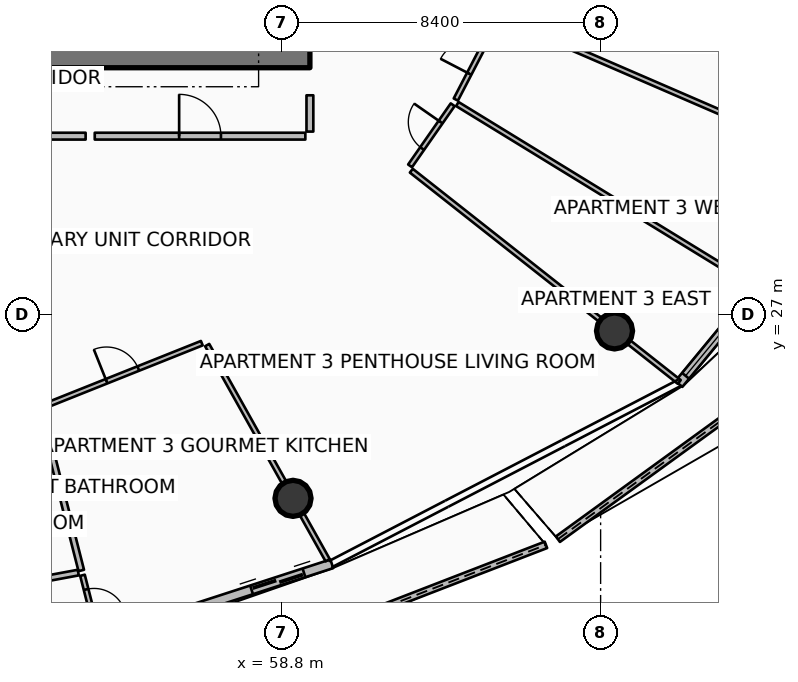
"""IFC4 building model, lengths in metres.
Left out: names, types, materials, properties, quantities, classifications, styles, units other than length and angle.
Written with IfcOpenShell. Run it as: python <this file> out.ifc"""

import sys

from ifc_helpers import new_model, si_unit, direction, frame, frame_2d, origin, origin_2d, place, context, subcontext, project, spatial, polyline, rectangle, circle, outline, extrude, element, fill, save


model = new_model("IFC4")
c1 = context("Model", 3, precision=1e-05, world=origin(), true_north=direction((0.0, 1.0)))
c2 = subcontext(c1, "Body", "Model", "MODEL_VIEW")
j1 = project(units=[si_unit("LENGTHUNIT", "METRE"), si_unit("PLANEANGLEUNIT", "RADIAN")], contexts=[c1])
p1 = place(None, origin())
s1 = spatial("IfcSite", under=j1, at=p1, CompositionType="ELEMENT")
p2 = place(p1, origin())
s2 = spatial("IfcBuilding", under=s1, at=p2, CompositionType="ELEMENT")
p3 = place(p2, frame((0.0, 0.0, 275.2)))
s3 = spatial("IfcBuildingStorey", under=s2, at=p3, CompositionType="ELEMENT", Elevation=275.2)
p4 = place(p3, frame((49.95, 33.75, 0.0), z_axis=(0.0, 0.0, 1.0), x_axis=(1.0, 0.0, 0.0)))
e1 = element("IfcWall", 1, at=p4, inside=s3, PredefinedType="SHEAR", context=c2, shape_type="SweptSolid", body=[
    extrude(rectangle(XDim=9.6, YDim=0.5, at=frame_2d((4.8, 0.0))), origin(), (0.0, 0.0, 1.0), 3.85),
])
for number, where, z_axis, x_axis in (
    (2, (59.105, 22.17, 0.0), (0.0, 0.0, 1.0), (1.0, 0.0, 0.0)),
    (3, (67.566, 26.575, 0.0), (0.0, 0.0, 1.0), (1.0, 0.0, 0.0)),
):
    element("IfcColumn", number, at=place(p3, frame(where, z_axis=z_axis, x_axis=x_axis)), inside=s3, PredefinedType="COLUMN", context=c2, shape_type="SweptSolid", body=[
        extrude(circle(Radius=0.475, at=origin_2d()), origin(), (0.0, 0.0, 1.0), 3.59),
    ])
p5 = place(p3, frame((56.172, 17.238, 0.0), z_axis=(0.0, 0.0, 1.0), x_axis=(0.9326848715, 0.36069229334, 0.0)))
e4 = element("IfcWall", 4, at=p5, inside=s3, PredefinedType="PARAPET", context=c2, shape_type="SweptSolid", body=[
    extrude(outline(polyline([(0.0, 0.0), (10.281, 0.0), (10.281, 1.224), (5.14, 1.127), (0.0, 1.148), (0.0, 0.0)])), frame((0.0, 0.09, 0.0), z_axis=(0.0, -1.0, 0.0), x_axis=(1.0, 0.0, 0.0)), (0.0, 0.0, 1.0), 0.18),
])
p6 = place(p3, frame((66.076, 21.095, 0.0), z_axis=(0.0, 0.0, 1.0), x_axis=(0.809261043527, 0.587449200722, 0.0)))
e5 = element("IfcWall", 5, at=p6, inside=s3, PredefinedType="PARAPET", context=c2, shape_type="SweptSolid", body=[
    extrude(outline(polyline([(0.0, 0.0), (11.577, 0.0), (11.577, 1.632), (5.788, 1.418), (0.0, 1.233), (0.0, 0.0)])), frame((0.0, 0.09, 0.0), z_axis=(0.0, -1.0, 0.0), x_axis=(1.0, 0.0, 0.0)), (0.0, 0.0, 1.0), 0.18),
])
p7 = place(p3, frame((50.858, 17.436, 0.0), z_axis=(0.0, 0.0, 1.0), x_axis=(0.951055974609, 0.309018661507, 0.0)))
e6 = element("IfcWall", 6, at=p7, inside=s3, PredefinedType="SOLIDWALL", context=c2, shape_type="SweptSolid", body=[
    extrude(rectangle(XDim=9.745, YDim=0.24, at=frame_2d((4.873, 0.0))), origin(), (0.0, 0.0, 1.0), 2.54),
])
p8 = place(p7, frame((7.525, 0.0, 0.0)))
e7 = element("IfcOpeningElement", 7, at=p8, cuts=e6, PredefinedType="OPENING", context=c2, shape_type="SweptSolid", body=[
    extrude(rectangle(XDim=1.45, YDim=2.15, at=frame_2d((0.725, 1.075))), frame((0.0, 0.13, 0.0), z_axis=(0.0, -1.0, 0.0), x_axis=(1.0, 0.0, 0.0)), (0.0, 0.0, 1.0), 0.26),
])
p9 = place(p7, frame((0.28, 0.0, 0.65)))
e8 = element("IfcOpeningElement", 8, at=p9, cuts=e6, PredefinedType="OPENING", context=c2, shape_type="SweptSolid", body=[
    extrude(rectangle(XDim=1.6, YDim=1.5, at=frame_2d((0.8, 0.75))), frame((0.0, 0.13, 0.0), z_axis=(0.0, -1.0, 0.0), x_axis=(1.0, 0.0, 0.0)), (0.0, 0.0, 1.0), 0.26),
])
p10 = place(p3, frame((69.258, 25.178, 0.0), z_axis=(0.0, 0.0, 1.0), x_axis=(0.636680093065, 0.771128043255, 0.0)))
e9 = element("IfcWall", 9, at=p10, inside=s3, PredefinedType="SOLIDWALL", context=c2, shape_type="SweptSolid", body=[
    extrude(rectangle(XDim=11.438, YDim=0.24, at=frame_2d((5.719, 0.0))), origin(), (0.0, 0.0, 1.0), 2.54),
])
p11 = place(p10, frame((9.218, 0.0, 0.0)))
e10 = element("IfcOpeningElement", 10, at=p11, cuts=e9, PredefinedType="OPENING", context=c2, shape_type="SweptSolid", body=[
    extrude(rectangle(XDim=1.45, YDim=2.15, at=frame_2d((0.725, 1.075))), frame((0.0, 0.13, 0.0), z_axis=(0.0, -1.0, 0.0), x_axis=(1.0, 0.0, 0.0)), (0.0, 0.0, 1.0), 0.26),
])
p12 = place(p10, frame((0.28, 0.0, 0.65)))
e11 = element("IfcOpeningElement", 11, at=p12, cuts=e9, PredefinedType="OPENING", context=c2, shape_type="SweptSolid", body=[
    extrude(rectangle(XDim=1.6, YDim=1.5, at=frame_2d((0.8, 0.75))), frame((0.0, 0.13, 0.0), z_axis=(0.0, -1.0, 0.0), x_axis=(1.0, 0.0, 0.0)), (0.0, 0.0, 1.0), 0.26),
])
p13 = place(p3, frame((53.888, 31.7, 0.0), z_axis=(0.0, 0.0, 1.0), x_axis=(1.0, 0.0, 0.0)))
e12 = element("IfcWall", 12, at=p13, inside=s3, PredefinedType="PARTITIONING", context=c2, shape_type="SweptSolid", body=[
    extrude(rectangle(XDim=5.542, YDim=0.18, at=frame_2d((2.771, 0.0))), origin(), (0.0, 0.0, 1.0), 2.957),
])
p14 = place(p13, frame((2.221, 0.0, 0.0)))
e13 = element("IfcOpeningElement", 13, at=p14, cuts=e12, PredefinedType="OPENING", context=c2, shape_type="SweptSolid", body=[
    extrude(rectangle(XDim=1.1, YDim=2.1, at=frame_2d((0.55, 1.05))), frame((0.0, 0.1, 0.0), z_axis=(0.0, -1.0, 0.0), x_axis=(1.0, 0.0, 0.0)), (0.0, 0.0, 1.0), 0.2),
])
p15 = place(p3, frame((59.55, 31.82, 0.0), z_axis=(0.0, 0.0, 1.0), x_axis=(0.0, 1.0, 0.0)))
e14 = element("IfcWall", 14, at=p15, inside=s3, PredefinedType="PARTITIONING", context=c2, shape_type="SweptSolid", body=[
    extrude(rectangle(XDim=0.955, YDim=0.18, at=frame_2d((0.477, 0.0))), origin(), (0.0, 0.0, 1.0), 2.957),
])
p16 = place(p3, frame((49.339, 31.7, 0.0), z_axis=(0.0, 0.0, 1.0), x_axis=(1.0, 0.0, 0.0)))
e15 = element("IfcWall", 15, at=p16, inside=s3, PredefinedType="PARTITIONING", context=c2, shape_type="SweptSolid", body=[
    extrude(rectangle(XDim=4.309, YDim=0.18, at=frame_2d((2.155, 0.0))), origin(), (0.0, 0.0, 1.0), 2.957),
])
p17 = place(p3, frame((56.847, 26.203, 0.0), z_axis=(0.0, 0.0, 1.0), x_axis=(0.488636594114, -0.872487409017, 0.0)))
e16 = element("IfcWall", 16, at=p17, inside=s3, PredefinedType="PARTITIONING", context=c2, shape_type="SweptSolid", body=[
    extrude(rectangle(XDim=6.489, YDim=0.125, at=frame_2d((3.244, 0.0))), origin(), (0.0, 0.0, 1.0), 2.957),
])
p18 = place(p3, frame((50.738, 19.712, 0.0), z_axis=(0.0, 0.0, 1.0), x_axis=(0.983195760322, 0.18255436693, 0.0)))
e17 = element("IfcWall", 17, at=p18, inside=s3, PredefinedType="PARTITIONING", context=c2, shape_type="SweptSolid", body=[
    extrude(rectangle(XDim=2.763, YDim=0.15, at=frame_2d((1.381, 0.0))), origin(), (0.0, 0.0, 1.0), 2.957),
])
p19 = place(p3, frame((52.466, 24.464, 0.0), z_axis=(0.0, 0.0, 1.0), x_axis=(0.246795883472, -0.969067485731, 0.0)))
e18 = element("IfcWall", 18, at=p19, inside=s3, PredefinedType="PARTITIONING", context=c2, shape_type="SweptSolid", body=[
    extrude(rectangle(XDim=4.326, YDim=0.15, at=frame_2d((2.163, 0.0))), origin(), (0.0, 0.0, 1.0), 3.03),
])
p20 = place(p3, frame((53.565, 20.146, 0.0), z_axis=(0.0, 0.0, 1.0), x_axis=(0.24689818157, -0.969041427359, 0.0)))
e19 = element("IfcWall", 19, at=p20, inside=s3, PredefinedType="PARTITIONING", context=c2, shape_type="SweptSolid", body=[
    extrude(rectangle(XDim=1.619, YDim=0.125, at=frame_2d((0.809, 0.0))), origin(), (0.0, 0.0, 1.0), 3.03),
])
p21 = place(p20, frame((0.385, 0.0, 0.0)))
e20 = element("IfcOpeningElement", 20, at=p21, cuts=e19, PredefinedType="OPENING", context=c2, shape_type="SweptSolid", body=[
    extrude(rectangle(XDim=0.85, YDim=2.06, at=frame_2d((0.425, 1.03))), frame((0.0, 0.073, 0.0), z_axis=(0.0, -1.0, 0.0), x_axis=(1.0, 0.0, 0.0)), (0.0, 0.0, 1.0), 0.145),
])
p22 = place(p3, frame((52.527, 24.584, 0.0), z_axis=(0.0, 0.0, 1.0), x_axis=(0.928678664633, 0.370885343274, 0.0)))
e21 = element("IfcWall", 21, at=p22, inside=s3, PredefinedType="PARTITIONING", context=c2, shape_type="SweptSolid", body=[
    extrude(rectangle(XDim=4.499, YDim=0.125, at=frame_2d((2.249, 0.0))), origin(), (0.0, 0.0, 1.0), 2.957),
])
p23 = place(p22, frame((1.799, 0.0, 0.0)))
e22 = element("IfcOpeningElement", 22, at=p23, cuts=e21, PredefinedType="OPENING", context=c2, shape_type="SweptSolid", body=[
    extrude(rectangle(XDim=0.9, YDim=2.08, at=frame_2d((0.45, 1.04))), frame((0.0, 0.073, 0.0), z_axis=(0.0, -1.0, 0.0), x_axis=(1.0, 0.0, 0.0)), (0.0, 0.0, 1.0), 0.145),
])
p24 = place(p3, frame((62.219, 30.791, 0.0), z_axis=(0.0, 0.0, 1.0), x_axis=(0.785316198055, -0.619094878893, 0.0)))
e23 = element("IfcWall", 23, at=p24, inside=s3, PredefinedType="PARTITIONING", context=c2, shape_type="SweptSolid", body=[
    extrude(rectangle(XDim=8.979, YDim=0.125, at=frame_2d((4.489, 0.0))), origin(), (0.0, 0.0, 1.0), 2.957),
])
p25 = place(p3, frame((63.429, 32.545, 0.0), z_axis=(0.0, 0.0, 1.0), x_axis=(0.852634226121, -0.522508254907, 0.0)))
e24 = element("IfcWall", 24, at=p25, inside=s3, PredefinedType="PARTITIONING", context=c2, shape_type="SweptSolid", body=[
    extrude(rectangle(XDim=9.151, YDim=0.125, at=frame_2d((4.576, 0.0))), origin(), (0.0, 0.0, 1.0), 3.03),
])
p26 = place(p3, frame((64.608, 34.813, 0.0), z_axis=(0.0, 0.0, 1.0), x_axis=(0.917754543675, -0.397148080146, 0.0)))
e25 = element("IfcWall", 25, at=p26, inside=s3, PredefinedType="PARTITIONING", context=c2, shape_type="SweptSolid", body=[
    extrude(rectangle(XDim=9.994, YDim=0.125, at=frame_2d((4.997, 0.0))), origin(), (0.0, 0.0, 1.0), 3.03),
])
p27 = place(p3, frame((62.186, 30.918, 0.0), z_axis=(0.0, 0.0, 1.0), x_axis=(0.571797742108, 0.820394625848, 0.0)))
e26 = element("IfcWall", 26, at=p27, inside=s3, PredefinedType="PARTITIONING", context=c2, shape_type="SweptSolid", body=[
    extrude(rectangle(XDim=1.96, YDim=0.125, at=frame_2d((0.98, 0.0))), origin(), (0.0, 0.0, 1.0), 2.957),
])
p28 = place(p27, frame((0.555, 0.0, 0.0)))
e27 = element("IfcOpeningElement", 27, at=p28, cuts=e26, PredefinedType="OPENING", context=c2, shape_type="SweptSolid", body=[
    extrude(rectangle(XDim=0.85, YDim=2.06, at=frame_2d((0.425, 1.03))), frame((0.0, 0.073, 0.0), z_axis=(0.0, -1.0, 0.0), x_axis=(1.0, 0.0, 0.0)), (0.0, 0.0, 1.0), 0.145),
])
p29 = place(p3, frame((63.389, 32.663, 0.0), z_axis=(0.0, 0.0, 1.0), x_axis=(0.461007635573, 0.887396168542, 0.0)))
e28 = element("IfcWall", 28, at=p29, inside=s3, PredefinedType="PARTITIONING", context=c2, shape_type="SweptSolid", body=[
    extrude(rectangle(XDim=2.384, YDim=0.125, at=frame_2d((1.192, 0.0))), origin(), (0.0, 0.0, 1.0), 3.03),
])
p30 = place(p29, frame((0.767, 0.0, 0.0)))
e29 = element("IfcOpeningElement", 29, at=p30, cuts=e28, PredefinedType="OPENING", context=c2, shape_type="SweptSolid", body=[
    extrude(rectangle(XDim=0.85, YDim=2.06, at=frame_2d((0.425, 1.03))), frame((0.0, 0.073, 0.0), z_axis=(0.0, -1.0, 0.0), x_axis=(1.0, 0.0, 0.0)), (0.0, 0.0, 1.0), 0.145),
])
p31 = place(p8, origin())
e30 = element("IfcDoor", 30, at=p31, inside=s3, OperationType="DOUBLE_DOOR_SLIDING", PredefinedType="DOOR", context=c2, shape_type="SweptSolid", body=[
    extrude(rectangle(XDim=1.45, YDim=2.15, at=frame_2d((0.725, 1.075))), frame((0.0, 0.025, 0.0), z_axis=(0.0, -1.0, 0.0), x_axis=(1.0, 0.0, 0.0)), (0.0, 0.0, 1.0), 0.05),
])
fill(e7, e30)
p32 = place(p12, origin())
e31 = element("IfcWindow", 31, at=p32, inside=s3, PartitioningType="SINGLE_PANEL", PredefinedType="WINDOW", context=c2, shape_type="SweptSolid", body=[
    extrude(rectangle(XDim=1.6, YDim=1.5, at=frame_2d((0.8, 0.75))), frame((0.0, 0.03, 0.0), z_axis=(0.0, -1.0, 0.0), x_axis=(1.0, 0.0, 0.0)), (0.0, 0.0, 1.0), 0.06),
])
fill(e11, e31)
p33 = place(p14, origin())
e32 = element("IfcDoor", 32, at=p33, inside=s3, OperationType="SINGLE_SWING_LEFT", PredefinedType="DOOR", context=c2, shape_type="SweptSolid", body=[
    extrude(rectangle(XDim=1.1, YDim=2.1, at=frame_2d((0.55, 1.05))), frame((0.0, 0.025, 0.0), z_axis=(0.0, -1.0, 0.0), x_axis=(1.0, 0.0, 0.0)), (0.0, 0.0, 1.0), 0.05),
])
fill(e13, e32)
p34 = place(p21, origin())
e33 = element("IfcDoor", 33, at=p34, inside=s3, OperationType="SINGLE_SWING_RIGHT", PredefinedType="DOOR", context=c2, shape_type="SweptSolid", body=[
    extrude(rectangle(XDim=0.85, YDim=2.06, at=frame_2d((0.425, 1.03))), frame((0.0, 0.025, 0.0), z_axis=(0.0, -1.0, 0.0), x_axis=(1.0, 0.0, 0.0)), (0.0, 0.0, 1.0), 0.05),
])
fill(e20, e33)
p35 = place(p23, origin())
e34 = element("IfcDoor", 34, at=p35, inside=s3, OperationType="SINGLE_SWING_LEFT", PredefinedType="DOOR", context=c2, shape_type="SweptSolid", body=[
    extrude(rectangle(XDim=0.9, YDim=2.08, at=frame_2d((0.45, 1.04))), frame((0.0, 0.025, 0.0), z_axis=(0.0, -1.0, 0.0), x_axis=(1.0, 0.0, 0.0)), (0.0, 0.0, 1.0), 0.05),
])
fill(e22, e34)
p36 = place(p28, origin())
e35 = element("IfcDoor", 35, at=p36, inside=s3, OperationType="SINGLE_SWING_RIGHT", PredefinedType="DOOR", context=c2, shape_type="SweptSolid", body=[
    extrude(rectangle(XDim=0.85, YDim=2.06, at=frame_2d((0.425, 1.03))), frame((0.0, 0.025, 0.0), z_axis=(0.0, -1.0, 0.0), x_axis=(1.0, 0.0, 0.0)), (0.0, 0.0, 1.0), 0.05),
])
fill(e27, e35)
p37 = place(p30, origin())
e36 = element("IfcDoor", 36, at=p37, inside=s3, OperationType="SINGLE_SWING_LEFT", PredefinedType="DOOR", context=c2, shape_type="SweptSolid", body=[
    extrude(rectangle(XDim=0.85, YDim=2.06, at=frame_2d((0.425, 1.03))), frame((0.0, 0.025, 0.0), z_axis=(0.0, -1.0, 0.0), x_axis=(1.0, 0.0, 0.0)), (0.0, 0.0, 1.0), 0.05),
])
fill(e29, e36)
save(model, sys.argv[1])
